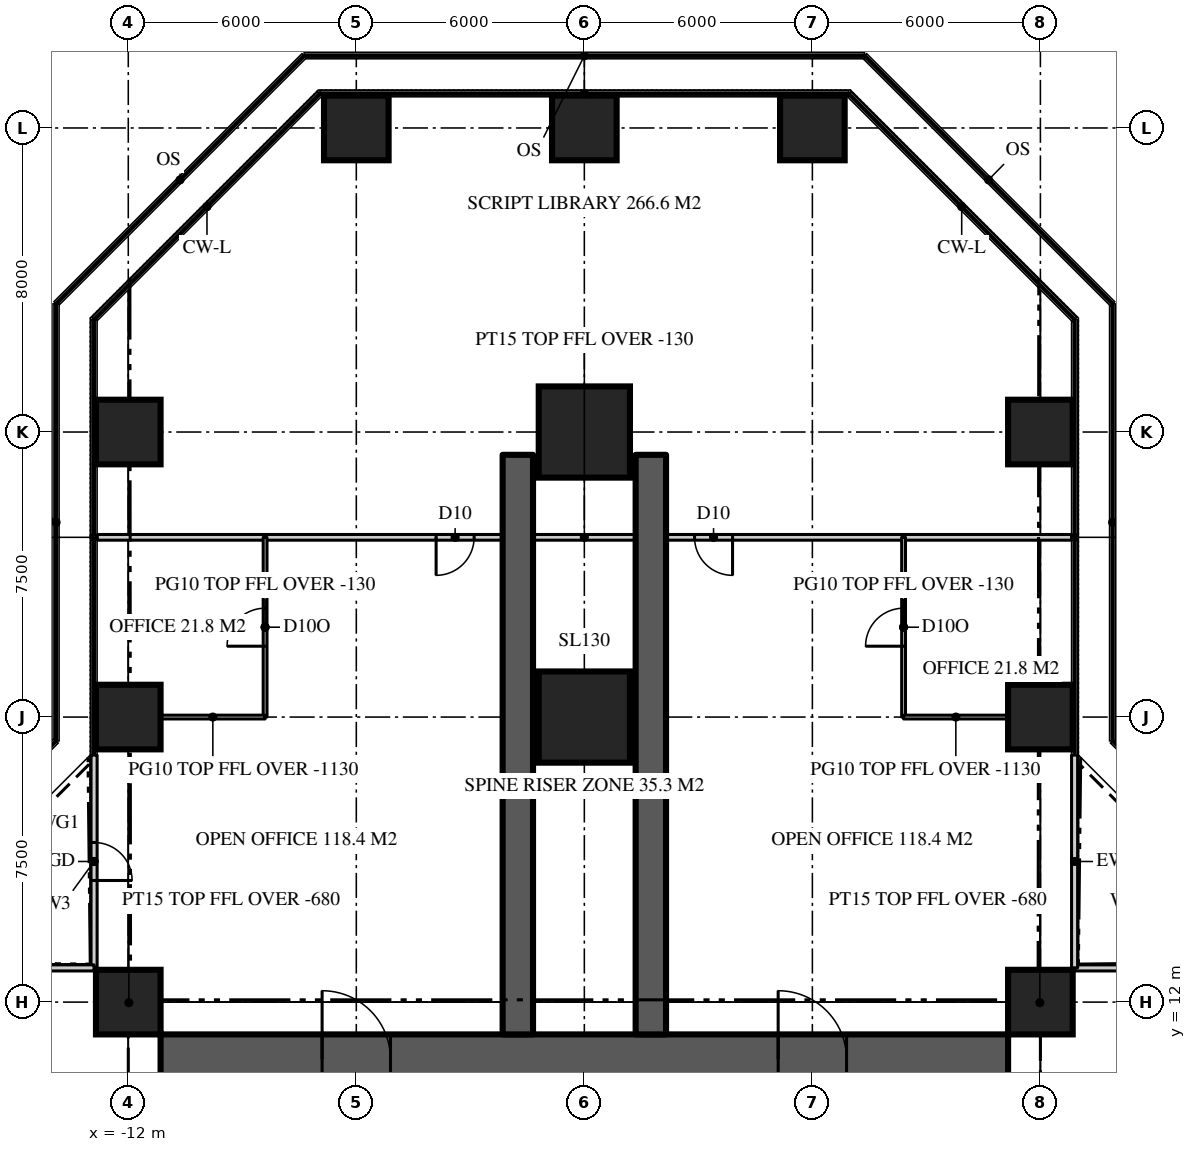
"""IFC4 building model, lengths in metres.
Left out: names, types, materials, properties, quantities, classifications, styles, units other than length and angle.
Written with IfcOpenShell. Run it as: python <this file> out.ifc"""

import sys

from ifc_helpers import new_model, si_unit, direction, frame, frame_2d, origin, origin_2d, place, context, subcontext, project, spatial, rectangle, extrude, element, fill, save


model = new_model("IFC4")
c1 = context("Model", 3, precision=1e-05, world=origin(), true_north=direction((0.0, 1.0)))
c2 = subcontext(c1, "Body", "Model", "MODEL_VIEW")
j1 = project(units=[si_unit("LENGTHUNIT", "METRE"), si_unit("PLANEANGLEUNIT", "RADIAN")], contexts=[c1])
p1 = place(None, origin())
s1 = spatial("IfcSite", under=j1, at=p1, CompositionType="ELEMENT")
p2 = place(p1, origin())
s2 = spatial("IfcBuilding", under=s1, at=p2, CompositionType="ELEMENT")
p3 = place(p2, frame((0.0, 0.0, 82.5)))
s3 = spatial("IfcBuildingStorey", under=s2, at=p3, CompositionType="ELEMENT", Elevation=82.5)
p4 = place(p3, frame((-11.15, 10.5, 0.0), z_axis=(0.0, 0.0, 1.0), x_axis=(1.0, 0.0, 0.0)))
e1 = element("IfcWall", 1, at=p4, inside=s3, PredefinedType="SHEAR", context=c2, shape_type="SweptSolid", body=[
    extrude(rectangle(XDim=22.3, YDim=1.3, at=frame_2d((11.15, 0.0))), origin(), (0.0, 0.0, 1.0), 3.9),
])
p5 = place(p4, frame((4.25, 0.0, 0.0)))
e2 = element("IfcOpeningElement", 2, at=p5, cuts=e1, PredefinedType="OPENING", context=c2, shape_type="SweptSolid", body=[
    extrude(rectangle(XDim=1.8, YDim=2.2, at=frame_2d((0.9, 1.1))), frame((0.0, 0.66, 0.0), z_axis=(0.0, -1.0, 0.0), x_axis=(1.0, 0.0, 0.0)), (0.0, 0.0, 1.0), 1.32),
])
p6 = place(p4, frame((16.25, 0.0, 0.0)))
e3 = element("IfcOpeningElement", 3, at=p6, cuts=e1, PredefinedType="OPENING", context=c2, shape_type="SweptSolid", body=[
    extrude(rectangle(XDim=1.8, YDim=2.2, at=frame_2d((0.9, 1.1))), frame((0.0, 0.66, 0.0), z_axis=(0.0, -1.0, 0.0), x_axis=(1.0, 0.0, 0.0)), (0.0, 0.0, 1.0), 1.32),
])
for number, where, z_axis, x_axis in (
    (4, (1.75, 11.15, 0.0), (0.0, 0.0, 1.0), (0.0, 1.0, 0.0)),
    (5, (-1.75, 11.15, 0.0), (0.0, 0.0, 1.0), (0.0, 1.0, 0.0)),
):
    element("IfcWall", number, at=place(p3, frame(where, z_axis=z_axis, x_axis=x_axis)), inside=s3, PredefinedType="SHEAR", context=c2, shape_type="SweptSolid", body=[
        extrude(rectangle(XDim=15.25, YDim=0.8, at=frame_2d((7.625, 0.0))), origin(), (0.0, 0.0, 1.0), 3.9),
    ])
for number, where, z_axis, x_axis in (
    (6, (-12.0, 12.0, 0.0), (0.0, 0.0, 1.0), (1.0, 0.0, 0.0)),
    (7, (12.0, 12.0, 0.0), (0.0, 0.0, 1.0), (1.0, 0.0, 0.0)),
    (8, (-12.0, 19.5, 0.0), (0.0, 0.0, 1.0), (1.0, 0.0, 0.0)),
):
    element("IfcColumn", number, at=place(p3, frame(where, z_axis=z_axis, x_axis=x_axis)), inside=s3, PredefinedType="COLUMN", context=c2, shape_type="SweptSolid", body=[
        extrude(rectangle(XDim=1.7, YDim=1.7, at=origin_2d()), origin(), (0.0, 0.0, 1.0), 3.9),
    ])
p7 = place(p3, frame((0.0, 19.5, 0.0), z_axis=(0.0, 0.0, 1.0), x_axis=(1.0, 0.0, 0.0)))
e9 = element("IfcColumn", 9, at=p7, inside=s3, PredefinedType="COLUMN", context=c2, shape_type="SweptSolid", body=[
    extrude(rectangle(XDim=2.4, YDim=2.4, at=origin_2d()), origin(), (0.0, 0.0, 1.0), 3.9),
])
for number, where, z_axis, x_axis in (
    (10, (12.0, 19.5, 0.0), (0.0, 0.0, 1.0), (1.0, 0.0, 0.0)),
    (11, (-12.0, 27.0, 0.0), (0.0, 0.0, 1.0), (1.0, 0.0, 0.0)),
):
    element("IfcColumn", number, at=place(p3, frame(where, z_axis=z_axis, x_axis=x_axis)), inside=s3, PredefinedType="COLUMN", context=c2, shape_type="SweptSolid", body=[
        extrude(rectangle(XDim=1.7, YDim=1.7, at=origin_2d()), origin(), (0.0, 0.0, 1.0), 3.9),
    ])
p8 = place(p3, frame((0.0, 27.0, 0.0), z_axis=(0.0, 0.0, 1.0), x_axis=(1.0, 0.0, 0.0)))
e12 = element("IfcColumn", 12, at=p8, inside=s3, PredefinedType="COLUMN", context=c2, shape_type="SweptSolid", body=[
    extrude(rectangle(XDim=2.4, YDim=2.4, at=origin_2d()), origin(), (0.0, 0.0, 1.0), 3.9),
])
for number, where, z_axis, x_axis in (
    (13, (12.0, 27.0, 0.0), (0.0, 0.0, 1.0), (1.0, 0.0, 0.0)),
    (14, (-6.0, 35.0, 0.0), (0.0, 0.0, 1.0), (1.0, 0.0, 0.0)),
    (15, (0.0, 35.0, 0.0), (0.0, 0.0, 1.0), (1.0, 0.0, 0.0)),
    (16, (6.0, 35.0, 0.0), (0.0, 0.0, 1.0), (1.0, 0.0, 0.0)),
):
    element("IfcColumn", number, at=place(p3, frame(where, z_axis=z_axis, x_axis=x_axis)), inside=s3, PredefinedType="COLUMN", context=c2, shape_type="SweptSolid", body=[
        extrude(rectangle(XDim=1.7, YDim=1.7, at=origin_2d()), origin(), (0.0, 0.0, 1.0), 3.9),
    ])
p9 = place(p3, frame((18.5, 12.9, 0.0), z_axis=(0.0, 0.0, 1.0), x_axis=(-1.0, 0.0, 0.0)))
e17 = element("IfcWall", 17, at=p9, inside=s3, PredefinedType="SOLIDWALL", context=c2, shape_type="SweptSolid", body=[
    extrude(rectangle(XDim=5.6, YDim=0.16, at=frame_2d((2.8, 0.0))), origin(), (0.0, 0.0, 1.0), 3.77),
])
p10 = place(p9, frame((2.3, 0.0, 0.0)))
e18 = element("IfcOpeningElement", 18, at=p10, cuts=e17, PredefinedType="OPENING", context=c2, shape_type="SweptSolid", body=[
    extrude(rectangle(XDim=1.0, YDim=2.2, at=frame_2d((0.5, 1.1))), frame((0.0, 0.09, 0.0), z_axis=(0.0, -1.0, 0.0), x_axis=(1.0, 0.0, 0.0)), (0.0, 0.0, 1.0), 0.18),
])
p11 = place(p3, frame((12.9, 12.9, 0.0), z_axis=(0.0, 0.0, 1.0), x_axis=(0.0, 1.0, 0.0)))
e19 = element("IfcWall", 19, at=p11, inside=s3, PredefinedType="SOLIDWALL", context=c2, shape_type="SweptSolid", body=[
    extrude(rectangle(XDim=5.6, YDim=0.16, at=frame_2d((2.8, 0.0))), origin(), (0.0, 0.0, 1.0), 3.77),
])
p12 = place(p3, frame((-12.9, 18.5, 0.0), z_axis=(0.0, 0.0, 1.0), x_axis=(0.0, -1.0, 0.0)))
e20 = element("IfcWall", 20, at=p12, inside=s3, PredefinedType="SOLIDWALL", context=c2, shape_type="SweptSolid", body=[
    extrude(rectangle(XDim=5.6, YDim=0.16, at=frame_2d((2.8, 0.0))), origin(), (0.0, 0.0, 1.0), 3.77),
])
p13 = place(p12, frame((2.3, 0.0, 0.0)))
e21 = element("IfcOpeningElement", 21, at=p13, cuts=e20, PredefinedType="OPENING", context=c2, shape_type="SweptSolid", body=[
    extrude(rectangle(XDim=1.0, YDim=2.2, at=frame_2d((0.5, 1.1))), frame((0.0, 0.09, 0.0), z_axis=(0.0, -1.0, 0.0), x_axis=(1.0, 0.0, 0.0)), (0.0, 0.0, 1.0), 0.18),
])
p14 = place(p3, frame((-12.9, 12.9, 0.0), z_axis=(0.0, 0.0, 1.0), x_axis=(-1.0, 0.0, 0.0)))
e22 = element("IfcWall", 22, at=p14, inside=s3, PredefinedType="SOLIDWALL", context=c2, shape_type="SweptSolid", body=[
    extrude(rectangle(XDim=5.6, YDim=0.16, at=frame_2d((2.8, 0.0))), origin(), (0.0, 0.0, 1.0), 3.77),
])
p15 = place(p3, frame((12.82, 24.229, 0.0), z_axis=(0.0, 0.0, 1.0), x_axis=(-1.0, 0.0, 0.0)))
e23 = element("IfcWall", 23, at=p15, inside=s3, PredefinedType="PARTITIONING", context=c2, shape_type="SweptSolid", body=[
    extrude(rectangle(XDim=25.64, YDim=0.15, at=frame_2d((12.82, 0.0))), origin(), (0.0, 0.0, 1.0), 3.77),
])
p16 = place(p15, frame((15.72, 0.0, 0.0)))
e24 = element("IfcOpeningElement", 24, at=p16, cuts=e23, PredefinedType="OPENING", context=c2, shape_type="SweptSolid", body=[
    extrude(rectangle(XDim=1.0, YDim=2.2, at=frame_2d((0.5, 1.1))), frame((0.0, 0.085, 0.0), z_axis=(0.0, -1.0, 0.0), x_axis=(1.0, 0.0, 0.0)), (0.0, 0.0, 1.0), 0.17),
])
p17 = place(p15, frame((8.92, 0.0, 0.0)))
e25 = element("IfcOpeningElement", 25, at=p17, cuts=e23, PredefinedType="OPENING", context=c2, shape_type="SweptSolid", body=[
    extrude(rectangle(XDim=1.0, YDim=2.2, at=frame_2d((0.5, 1.1))), frame((0.0, 0.085, 0.0), z_axis=(0.0, -1.0, 0.0), x_axis=(1.0, 0.0, 0.0)), (0.0, 0.0, 1.0), 0.17),
])
p18 = place(p3, frame((-8.4, 19.5, 0.0), z_axis=(0.0, 0.0, 1.0), x_axis=(0.0, 1.0, 0.0)))
e26 = element("IfcWall", 26, at=p18, inside=s3, PredefinedType="PARTITIONING", context=c2, shape_type="SweptSolid", body=[
    extrude(rectangle(XDim=4.729, YDim=0.1, at=frame_2d((2.365, 0.0))), origin(), (0.0, 0.0, 1.0), 3.77),
])
p19 = place(p18, frame((1.865, 0.0, 0.0)))
e27 = element("IfcOpeningElement", 27, at=p19, cuts=e26, PredefinedType="OPENING", context=c2, shape_type="SweptSolid", body=[
    extrude(rectangle(XDim=1.0, YDim=2.2, at=frame_2d((0.5, 1.1))), frame((0.0, 0.06, 0.0), z_axis=(0.0, -1.0, 0.0), x_axis=(1.0, 0.0, 0.0)), (0.0, 0.0, 1.0), 0.12),
])
p20 = place(p3, frame((-8.4, 19.5, 0.0), z_axis=(0.0, 0.0, 1.0), x_axis=(-1.0, 0.0, 0.0)))
e28 = element("IfcWall", 28, at=p20, inside=s3, PredefinedType="PARTITIONING", context=c2, shape_type="SweptSolid", body=[
    extrude(rectangle(XDim=2.75, YDim=0.1, at=frame_2d((1.375, 0.0))), origin(), (0.0, 0.0, 1.0), 2.77),
])
p21 = place(p3, frame((8.4, 19.5, 0.0), z_axis=(0.0, 0.0, 1.0), x_axis=(0.0, 1.0, 0.0)))
e29 = element("IfcWall", 29, at=p21, inside=s3, PredefinedType="PARTITIONING", context=c2, shape_type="SweptSolid", body=[
    extrude(rectangle(XDim=4.729, YDim=0.1, at=frame_2d((2.365, 0.0))), origin(), (0.0, 0.0, 1.0), 3.77),
])
p22 = place(p21, frame((1.865, 0.0, 0.0)))
e30 = element("IfcOpeningElement", 30, at=p22, cuts=e29, PredefinedType="OPENING", context=c2, shape_type="SweptSolid", body=[
    extrude(rectangle(XDim=1.0, YDim=2.2, at=frame_2d((0.5, 1.1))), frame((0.0, 0.06, 0.0), z_axis=(0.0, -1.0, 0.0), x_axis=(1.0, 0.0, 0.0)), (0.0, 0.0, 1.0), 0.12),
])
p23 = place(p3, frame((8.4, 19.5, 0.0), z_axis=(0.0, 0.0, 1.0), x_axis=(1.0, 0.0, 0.0)))
e31 = element("IfcWall", 31, at=p23, inside=s3, PredefinedType="PARTITIONING", context=c2, shape_type="SweptSolid", body=[
    extrude(rectangle(XDim=2.75, YDim=0.1, at=frame_2d((1.375, 0.0))), origin(), (0.0, 0.0, 1.0), 2.77),
])
for number, where, z_axis, x_axis in (
    (32, (11.15, 11.15, 0.0), (0.0, 0.0, 1.0), (0.707, 0.707, 0.0)),
    (33, (-11.15, 11.15, 0.0), (0.0, 0.0, 1.0), (-0.707, 0.707, 0.0)),
):
    element("IfcWall", number, at=place(p3, frame(where, z_axis=z_axis, x_axis=x_axis)), inside=s3, PredefinedType="PARTITIONING", context=c2, shape_type="SweptSolid", body=[
        extrude(rectangle(XDim=2.362, YDim=0.15, at=frame_2d((1.181, 0.0))), origin(), (0.0, 0.0, 1.0), 3.22),
    ])
p24 = place(p13, origin())
e34 = element("IfcDoor", 34, at=p24, inside=s3, OperationType="SINGLE_SWING_RIGHT", PredefinedType="DOOR", context=c2, shape_type="SweptSolid", body=[
    extrude(rectangle(XDim=1.0, YDim=2.2, at=frame_2d((0.5, 1.1))), frame((0.0, 0.025, 0.0), z_axis=(0.0, -1.0, 0.0), x_axis=(1.0, 0.0, 0.0)), (0.0, 0.0, 1.0), 0.05),
])
fill(e21, e34)
p25 = place(p5, origin())
e35 = element("IfcDoor", 35, at=p25, inside=s3, OperationType="DOUBLE_DOOR_DOUBLE_SWING", PredefinedType="DOOR", context=c2, shape_type="SweptSolid", body=[
    extrude(rectangle(XDim=1.8, YDim=2.2, at=frame_2d((0.9, 1.1))), frame((0.0, 0.025, 0.0), z_axis=(0.0, -1.0, 0.0), x_axis=(1.0, 0.0, 0.0)), (0.0, 0.0, 1.0), 0.05),
])
fill(e2, e35)
p26 = place(p6, origin())
e36 = element("IfcDoor", 36, at=p26, inside=s3, OperationType="DOUBLE_DOOR_DOUBLE_SWING", PredefinedType="DOOR", context=c2, shape_type="SweptSolid", body=[
    extrude(rectangle(XDim=1.8, YDim=2.2, at=frame_2d((0.9, 1.1))), frame((0.0, 0.025, 0.0), z_axis=(0.0, -1.0, 0.0), x_axis=(1.0, 0.0, 0.0)), (0.0, 0.0, 1.0), 0.05),
])
fill(e3, e36)
p27 = place(p16, origin())
e37 = element("IfcDoor", 37, at=p27, inside=s3, OperationType="SINGLE_SWING_RIGHT", PredefinedType="DOOR", context=c2, shape_type="SweptSolid", body=[
    extrude(rectangle(XDim=1.0, YDim=2.2, at=frame_2d((0.5, 1.1))), frame((0.0, 0.025, 0.0), z_axis=(0.0, -1.0, 0.0), x_axis=(1.0, 0.0, 0.0)), (0.0, 0.0, 1.0), 0.05),
])
fill(e24, e37)
p28 = place(p17, origin())
e38 = element("IfcDoor", 38, at=p28, inside=s3, OperationType="SINGLE_SWING_LEFT", PredefinedType="DOOR", context=c2, shape_type="SweptSolid", body=[
    extrude(rectangle(XDim=1.0, YDim=2.2, at=frame_2d((0.5, 1.1))), frame((0.0, 0.025, 0.0), z_axis=(0.0, -1.0, 0.0), x_axis=(1.0, 0.0, 0.0)), (0.0, 0.0, 1.0), 0.05),
])
fill(e25, e38)
p29 = place(p19, origin())
e39 = element("IfcDoor", 39, at=p29, inside=s3, OperationType="SINGLE_SWING_LEFT", PredefinedType="DOOR", context=c2, shape_type="SweptSolid", body=[
    extrude(rectangle(XDim=1.0, YDim=2.2, at=frame_2d((0.5, 1.1))), frame((0.0, 0.025, 0.0), z_axis=(0.0, -1.0, 0.0), x_axis=(1.0, 0.0, 0.0)), (0.0, 0.0, 1.0), 0.05),
])
fill(e27, e39)
p30 = place(p22, origin())
e40 = element("IfcDoor", 40, at=p30, inside=s3, OperationType="SINGLE_SWING_LEFT", PredefinedType="DOOR", context=c2, shape_type="SweptSolid", body=[
    extrude(rectangle(XDim=1.0, YDim=2.2, at=frame_2d((0.5, 1.1))), frame((0.0, 0.025, 0.0), z_axis=(0.0, -1.0, 0.0), x_axis=(1.0, 0.0, 0.0)), (0.0, 0.0, 1.0), 0.05),
])
fill(e30, e40)
save(model, sys.argv[1])
